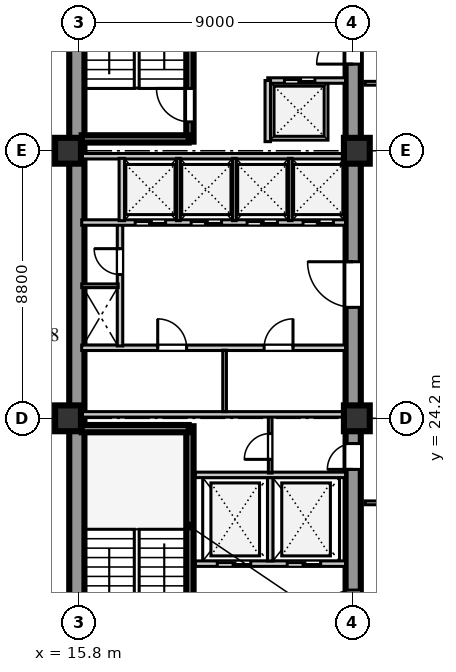
"""IFC4 building model, lengths in metres.
Left out: names, types, materials, properties, quantities, classifications, styles, units other than length and angle.
Written with IfcOpenShell. Run it as: python <this file> out.ifc"""

import sys

from ifc_helpers import new_model, si_unit, direction, frame, frame_2d, origin, origin_2d, place, context, subcontext, project, spatial, rectangle, extrude, element, fill, save


model = new_model("IFC4")
c1 = context("Model", 3, precision=1e-05, world=origin(), true_north=direction((0.0, 1.0)))
c2 = subcontext(c1, "Body", "Model", "MODEL_VIEW")
j1 = project(units=[si_unit("LENGTHUNIT", "METRE"), si_unit("PLANEANGLEUNIT", "RADIAN")], contexts=[c1])
p1 = place(None, origin())
s1 = spatial("IfcSite", under=j1, at=p1, CompositionType="ELEMENT")
p2 = place(p1, origin())
s2 = spatial("IfcBuilding", under=s1, at=p2, CompositionType="ELEMENT")
p3 = place(p2, frame((0.0, 0.0, 165.6)))
s3 = spatial("IfcBuildingStorey", under=s2, at=p3, CompositionType="ELEMENT", Elevation=165.6)
p4 = place(p3, frame((15.74, 15.81, 0.0), z_axis=(0.0, 0.0, 1.0), x_axis=(0.0, 1.0, 0.0)))
e1 = element("IfcWall", 1, at=p4, inside=s3, PredefinedType="SHEAR", context=c2, shape_type="SweptSolid", body=[
    extrude(rectangle(XDim=25.63, YDim=0.5, at=frame_2d((12.815, 0.0))), origin(), (0.0, 0.0, 1.0), 3.6),
])
p5 = place(p3, frame((24.83, 15.74, 0.0), z_axis=(0.0, 0.0, 1.0), x_axis=(0.0, 1.0, 0.0)))
e2 = element("IfcWall", 2, at=p5, inside=s3, PredefinedType="SHEAR", context=c2, shape_type="SweptSolid", body=[
    extrude(rectangle(XDim=25.76, YDim=0.5, at=frame_2d((12.88, 0.0))), origin(), (0.0, 0.0, 1.0), 3.6),
])
p6 = place(p5, frame((1.61, 0.0, 0.0)))
e3 = element("IfcOpeningElement", 3, at=p6, cuts=e2, PredefinedType="OPENING", context=c2, shape_type="SweptSolid", body=[
    extrude(rectangle(XDim=1.2, YDim=2.1, at=frame_2d((0.6, 1.05))), frame((0.0, 0.26, 0.0), z_axis=(0.0, -1.0, 0.0), x_axis=(1.0, 0.0, 0.0)), (0.0, 0.0, 1.0), 0.52),
])
p7 = place(p5, frame((6.78, 0.0, 0.0)))
e4 = element("IfcOpeningElement", 4, at=p7, cuts=e2, PredefinedType="OPENING", context=c2, shape_type="SweptSolid", body=[
    extrude(rectangle(XDim=0.85, YDim=2.06, at=frame_2d((0.425, 1.03))), frame((0.0, 0.26, 0.0), z_axis=(0.0, -1.0, 0.0), x_axis=(1.0, 0.0, 0.0)), (0.0, 0.0, 1.0), 0.52),
])
p8 = place(p5, frame((12.11, 0.0, 0.0)))
e5 = element("IfcOpeningElement", 5, at=p8, cuts=e2, PredefinedType="OPENING", context=c2, shape_type="SweptSolid", body=[
    extrude(rectangle(XDim=1.5, YDim=2.12, at=frame_2d((0.75, 1.06))), frame((0.0, 0.26, 0.0), z_axis=(0.0, -1.0, 0.0), x_axis=(1.0, 0.0, 0.0)), (0.0, 0.0, 1.0), 0.52),
])
p9 = place(p5, frame((20.11, 0.0, 0.0)))
e6 = element("IfcOpeningElement", 6, at=p9, cuts=e2, PredefinedType="OPENING", context=c2, shape_type="SweptSolid", body=[
    extrude(rectangle(XDim=1.2, YDim=2.12, at=frame_2d((0.6, 1.06))), frame((0.0, 0.26, 0.0), z_axis=(0.0, -1.0, 0.0), x_axis=(1.0, 0.0, 0.0)), (0.0, 0.0, 1.0), 0.52),
])
p10 = place(p5, frame((24.01, 0.0, 0.0)))
e7 = element("IfcOpeningElement", 7, at=p10, cuts=e2, PredefinedType="OPENING", context=c2, shape_type="SweptSolid", body=[
    extrude(rectangle(XDim=0.95, YDim=2.1, at=frame_2d((0.475, 1.05))), frame((0.0, 0.26, 0.0), z_axis=(0.0, -1.0, 0.0), x_axis=(1.0, 0.0, 0.0)), (0.0, 0.0, 1.0), 0.52),
])
for number, where, z_axis, x_axis in (
    (8, (15.45, 24.2, 0.0), (0.0, 0.0, 1.0), (1.0, 0.0, 0.0)),
    (9, (15.45, 33.0, 0.0), (0.0, 0.0, 1.0), (1.0, 0.0, 0.0)),
    (10, (24.95, 24.2, 0.0), (0.0, 0.0, 1.0), (1.0, 0.0, 0.0)),
    (11, (24.95, 33.0, 0.0), (0.0, 0.0, 1.0), (1.0, 0.0, 0.0)),
):
    element("IfcColumn", number, at=place(p3, frame(where, z_axis=z_axis, x_axis=x_axis)), inside=s3, PredefinedType="COLUMN", context=c2, shape_type="SweptSolid", body=[
        extrude(rectangle(XDim=0.85, YDim=0.85, at=origin_2d()), origin(), (0.0, 0.0, 1.0), 3.6),
    ])
p11 = place(p3, frame((19.46, 15.74, 0.0), z_axis=(0.0, 0.0, 1.0), x_axis=(0.0, 1.0, 0.0)))
e12 = element("IfcWall", 12, at=p11, inside=s3, PredefinedType="SHEAR", context=c2, shape_type="SweptSolid", body=[
    extrude(rectangle(XDim=8.2, YDim=0.24, at=frame_2d((4.1, 0.0))), origin(), (0.0, 0.0, 1.0), 3.85),
])
p12 = place(p11, frame((0.45, 0.0, 0.0)))
e13 = element("IfcOpeningElement", 13, at=p12, cuts=e12, PredefinedType="OPENING", context=c2, shape_type="SweptSolid", body=[
    extrude(rectangle(XDim=1.1, YDim=2.1, at=frame_2d((0.55, 1.05))), frame((0.0, 0.13, 0.0), z_axis=(0.0, -1.0, 0.0), x_axis=(1.0, 0.0, 0.0)), (0.0, 0.0, 1.0), 0.26),
])
p13 = place(p3, frame((15.9, 23.86, 0.0), z_axis=(0.0, 0.0, 1.0), x_axis=(1.0, 0.0, 0.0)))
e14 = element("IfcWall", 14, at=p13, inside=s3, PredefinedType="SHEAR", context=c2, shape_type="SweptSolid", body=[
    extrude(rectangle(XDim=3.52, YDim=0.24, at=frame_2d((1.76, 0.0))), origin(), (0.0, 0.0, 1.0), 3.85),
])
p14 = place(p3, frame((19.64, 19.42, 0.0), z_axis=(0.0, 0.0, 1.0), x_axis=(1.0, 0.0, 0.0)))
e15 = element("IfcWall", 15, at=p14, inside=s3, PredefinedType="SOLIDWALL", context=c2, shape_type="SweptSolid", body=[
    extrude(rectangle(XDim=4.94, YDim=0.18, at=frame_2d((2.47, 0.0))), origin(), (0.0, 0.0, 1.0), 3.6),
])
p15 = place(p14, frame((0.72, 0.0, 0.0)))
e16 = element("IfcOpeningElement", 16, at=p15, cuts=e15, PredefinedType="OPENING", context=c2, shape_type="SweptSolid", body=[
    extrude(rectangle(XDim=1.1, YDim=2.1, at=frame_2d((0.55, 1.05))), frame((0.0, 0.1, 0.0), z_axis=(0.0, -1.0, 0.0), x_axis=(1.0, 0.0, 0.0)), (0.0, 0.0, 1.0), 0.2),
])
p16 = place(p14, frame((3.02, 0.0, 0.0)))
e17 = element("IfcOpeningElement", 17, at=p16, cuts=e15, PredefinedType="OPENING", context=c2, shape_type="SweptSolid", body=[
    extrude(rectangle(XDim=1.1, YDim=2.1, at=frame_2d((0.55, 1.05))), frame((0.0, 0.1, 0.0), z_axis=(0.0, -1.0, 0.0), x_axis=(1.0, 0.0, 0.0)), (0.0, 0.0, 1.0), 0.2),
])
p17 = place(p3, frame((22.1, 19.51, 0.0), z_axis=(0.0, 0.0, 1.0), x_axis=(0.0, 1.0, 0.0)))
e18 = element("IfcWall", 18, at=p17, inside=s3, PredefinedType="SOLIDWALL", context=c2, shape_type="SweptSolid", body=[
    extrude(rectangle(XDim=2.74, YDim=0.18, at=frame_2d((1.37, 0.0))), origin(), (0.0, 0.0, 1.0), 3.6),
])
p18 = place(p3, frame((19.64, 22.34, 0.0), z_axis=(0.0, 0.0, 1.0), x_axis=(1.0, 0.0, 0.0)))
e19 = element("IfcWall", 19, at=p18, inside=s3, PredefinedType="SOLIDWALL", context=c2, shape_type="SweptSolid", body=[
    extrude(rectangle(XDim=4.94, YDim=0.18, at=frame_2d((2.47, 0.0))), origin(), (0.0, 0.0, 1.0), 3.6),
])
p19 = place(p3, frame((22.1, 22.4, 0.0), z_axis=(0.0, 0.0, 1.0), x_axis=(0.0, 1.0, 0.0)))
e20 = element("IfcWall", 20, at=p19, inside=s3, PredefinedType="PARTITIONING", context=c2, shape_type="SweptSolid", body=[
    extrude(rectangle(XDim=1.88, YDim=0.12, at=frame_2d((0.94, 0.0))), origin(), (0.0, 0.0, 1.0), 3.6),
])
p20 = place(p19, frame((0.45, 0.0, 0.0)))
e21 = element("IfcOpeningElement", 21, at=p20, cuts=e20, PredefinedType="OPENING", context=c2, shape_type="SweptSolid", body=[
    extrude(rectangle(XDim=0.85, YDim=2.06, at=frame_2d((0.425, 1.03))), frame((0.0, 0.07, 0.0), z_axis=(0.0, -1.0, 0.0), x_axis=(1.0, 0.0, 0.0)), (0.0, 0.0, 1.0), 0.14),
])
p21 = place(p3, frame((15.9, 26.52, 0.0), z_axis=(0.0, 0.0, 1.0), x_axis=(1.0, 0.0, 0.0)))
e22 = element("IfcWall", 22, at=p21, inside=s3, PredefinedType="SOLIDWALL", context=c2, shape_type="SweptSolid", body=[
    extrude(rectangle(XDim=8.68, YDim=0.18, at=frame_2d((4.34, 0.0))), origin(), (0.0, 0.0, 1.0), 3.6),
])
p22 = place(p21, frame((2.5, 0.0, 0.0)))
e23 = element("IfcOpeningElement", 23, at=p22, cuts=e22, PredefinedType="OPENING", context=c2, shape_type="SweptSolid", body=[
    extrude(rectangle(XDim=0.95, YDim=2.1, at=frame_2d((0.475, 1.05))), frame((0.0, 0.1, 0.0), z_axis=(0.0, -1.0, 0.0), x_axis=(1.0, 0.0, 0.0)), (0.0, 0.0, 1.0), 0.2),
])
p23 = place(p21, frame((6.0, 0.0, 0.0)))
e24 = element("IfcOpeningElement", 24, at=p23, cuts=e22, PredefinedType="OPENING", context=c2, shape_type="SweptSolid", body=[
    extrude(rectangle(XDim=0.95, YDim=2.1, at=frame_2d((0.475, 1.05))), frame((0.0, 0.1, 0.0), z_axis=(0.0, -1.0, 0.0), x_axis=(1.0, 0.0, 0.0)), (0.0, 0.0, 1.0), 0.2),
])
p24 = place(p3, frame((15.9, 24.33, 0.0), z_axis=(0.0, 0.0, 1.0), x_axis=(1.0, 0.0, 0.0)))
e25 = element("IfcWall", 25, at=p24, inside=s3, PredefinedType="SOLIDWALL", context=c2, shape_type="SweptSolid", body=[
    extrude(rectangle(XDim=8.68, YDim=0.18, at=frame_2d((4.34, 0.0))), origin(), (0.0, 0.0, 1.0), 2.95),
])
p25 = place(p3, frame((20.6, 24.42, 0.0), z_axis=(0.0, 0.0, 1.0), x_axis=(0.0, 1.0, 0.0)))
e26 = element("IfcWall", 26, at=p25, inside=s3, PredefinedType="PARTITIONING", context=c2, shape_type="SweptSolid", body=[
    extrude(rectangle(XDim=2.02, YDim=0.12, at=frame_2d((1.01, 0.0))), origin(), (0.0, 0.0, 1.0), 3.6),
])
p26 = place(p3, frame((17.16, 26.58, 0.0), z_axis=(0.0, 0.0, 1.0), x_axis=(0.0, 1.0, 0.0)))
e27 = element("IfcWall", 27, at=p26, inside=s3, PredefinedType="SOLIDWALL", context=c2, shape_type="SweptSolid", body=[
    extrude(rectangle(XDim=4.02, YDim=0.18, at=frame_2d((2.01, 0.0))), origin(), (0.0, 0.0, 1.0), 3.6),
])
p27 = place(p26, frame((2.35, 0.0, 0.0)))
e28 = element("IfcOpeningElement", 28, at=p27, cuts=e27, PredefinedType="OPENING", context=c2, shape_type="SweptSolid", body=[
    extrude(rectangle(XDim=0.85, YDim=2.06, at=frame_2d((0.425, 1.03))), frame((0.0, 0.1, 0.0), z_axis=(0.0, -1.0, 0.0), x_axis=(1.0, 0.0, 0.0)), (0.0, 0.0, 1.0), 0.2),
])
p28 = place(p3, frame((15.9, 28.56, 0.0), z_axis=(0.0, 0.0, 1.0), x_axis=(1.0, 0.0, 0.0)))
e29 = element("IfcWall", 29, at=p28, inside=s3, PredefinedType="PARTITIONING", context=c2, shape_type="SweptSolid", body=[
    extrude(rectangle(XDim=1.2, YDim=0.12, at=frame_2d((0.6, 0.0))), origin(), (0.0, 0.0, 1.0), 3.6),
])
p29 = place(p3, frame((15.9, 30.64, 0.0), z_axis=(0.0, 0.0, 1.0), x_axis=(1.0, 0.0, 0.0)))
e30 = element("IfcWall", 30, at=p29, inside=s3, PredefinedType="SOLIDWALL", context=c2, shape_type="SweptSolid", body=[
    extrude(rectangle(XDim=8.68, YDim=0.18, at=frame_2d((4.34, 0.0))), origin(), (0.0, 0.0, 1.0), 3.6),
])
p30 = place(p29, frame((1.76, 0.0, 0.0)))
e31 = element("IfcOpeningElement", 31, at=p30, cuts=e30, PredefinedType="OPENING", context=c2, shape_type="SweptSolid", body=[
    extrude(rectangle(XDim=1.0, YDim=2.1, at=frame_2d((0.5, 1.05))), frame((0.0, 0.1, 0.0), z_axis=(0.0, -1.0, 0.0), x_axis=(1.0, 0.0, 0.0)), (0.0, 0.0, 1.0), 0.2),
])
p31 = place(p29, frame((3.6, 0.0, 0.0)))
e32 = element("IfcOpeningElement", 32, at=p31, cuts=e30, PredefinedType="OPENING", context=c2, shape_type="SweptSolid", body=[
    extrude(rectangle(XDim=1.0, YDim=2.1, at=frame_2d((0.5, 1.05))), frame((0.0, 0.1, 0.0), z_axis=(0.0, -1.0, 0.0), x_axis=(1.0, 0.0, 0.0)), (0.0, 0.0, 1.0), 0.2),
])
p32 = place(p29, frame((5.44, 0.0, 0.0)))
e33 = element("IfcOpeningElement", 33, at=p32, cuts=e30, PredefinedType="OPENING", context=c2, shape_type="SweptSolid", body=[
    extrude(rectangle(XDim=1.0, YDim=2.1, at=frame_2d((0.5, 1.05))), frame((0.0, 0.1, 0.0), z_axis=(0.0, -1.0, 0.0), x_axis=(1.0, 0.0, 0.0)), (0.0, 0.0, 1.0), 0.2),
])
p33 = place(p29, frame((7.28, 0.0, 0.0)))
e34 = element("IfcOpeningElement", 34, at=p33, cuts=e30, PredefinedType="OPENING", context=c2, shape_type="SweptSolid", body=[
    extrude(rectangle(XDim=1.0, YDim=2.1, at=frame_2d((0.5, 1.05))), frame((0.0, 0.1, 0.0), z_axis=(0.0, -1.0, 0.0), x_axis=(1.0, 0.0, 0.0)), (0.0, 0.0, 1.0), 0.2),
])
p34 = place(p3, frame((15.9, 32.82, 0.0), z_axis=(0.0, 0.0, 1.0), x_axis=(1.0, 0.0, 0.0)))
e35 = element("IfcWall", 35, at=p34, inside=s3, PredefinedType="SOLIDWALL", context=c2, shape_type="SweptSolid", body=[
    extrude(rectangle(XDim=8.68, YDim=0.18, at=frame_2d((4.34, 0.0))), origin(), (0.0, 0.0, 1.0), 2.95),
])
p35 = place(p3, frame((17.22, 30.7, 0.0), z_axis=(0.0, 0.0, 1.0), x_axis=(0.0, 1.0, 0.0)))
e36 = element("IfcWall", 36, at=p35, inside=s3, PredefinedType="SOLIDWALL", context=c2, shape_type="SweptSolid", body=[
    extrude(rectangle(XDim=2.05, YDim=0.18, at=frame_2d((1.025, 0.0))), origin(), (0.0, 0.0, 1.0), 3.6),
])
for number, where, z_axis, x_axis in (
    (37, (19.08, 30.7, 0.0), (0.0, 0.0, 1.0), (0.0, 1.0, 0.0)),
    (38, (20.92, 30.7, 0.0), (0.0, 0.0, 1.0), (0.0, 1.0, 0.0)),
    (39, (22.76, 30.7, 0.0), (0.0, 0.0, 1.0), (0.0, 1.0, 0.0)),
):
    element("IfcWall", number, at=place(p3, frame(where, z_axis=z_axis, x_axis=x_axis)), inside=s3, PredefinedType="PARTITIONING", context=c2, shape_type="SweptSolid", body=[
        extrude(rectangle(XDim=2.05, YDim=0.12, at=frame_2d((1.025, 0.0))), origin(), (0.0, 0.0, 1.0), 3.6),
    ])
p36 = place(p3, frame((19.46, 33.3, 0.0), z_axis=(0.0, 0.0, 1.0), x_axis=(0.0, 1.0, 0.0)))
e40 = element("IfcWall", 40, at=p36, inside=s3, PredefinedType="SHEAR", context=c2, shape_type="SweptSolid", body=[
    extrude(rectangle(XDim=8.18, YDim=0.24, at=frame_2d((4.09, 0.0))), origin(), (0.0, 0.0, 1.0), 3.85),
])
p37 = place(p36, frame((0.65, 0.0, 0.0)))
e41 = element("IfcOpeningElement", 41, at=p37, cuts=e40, PredefinedType="OPENING", context=c2, shape_type="SweptSolid", body=[
    extrude(rectangle(XDim=1.1, YDim=2.1, at=frame_2d((0.55, 1.05))), frame((0.0, 0.13, 0.0), z_axis=(0.0, -1.0, 0.0), x_axis=(1.0, 0.0, 0.0)), (0.0, 0.0, 1.0), 0.26),
])
p38 = place(p3, frame((15.9, 33.39, 0.0), z_axis=(0.0, 0.0, 1.0), x_axis=(1.0, 0.0, 0.0)))
e42 = element("IfcWall", 42, at=p38, inside=s3, PredefinedType="SHEAR", context=c2, shape_type="SweptSolid", body=[
    extrude(rectangle(XDim=3.52, YDim=0.24, at=frame_2d((1.76, 0.0))), origin(), (0.0, 0.0, 1.0), 3.85),
])
p39 = place(p3, frame((22.02, 35.31, 0.0), z_axis=(0.0, 0.0, 1.0), x_axis=(1.0, 0.0, 0.0)))
e43 = element("IfcWall", 43, at=p39, inside=s3, PredefinedType="SOLIDWALL", context=c2, shape_type="SweptSolid", body=[
    extrude(rectangle(XDim=2.56, YDim=0.18, at=frame_2d((1.28, 0.0))), origin(), (0.0, 0.0, 1.0), 3.6),
])
p40 = place(p39, frame((0.55, 0.0, 0.0)))
e44 = element("IfcOpeningElement", 44, at=p40, cuts=e43, PredefinedType="OPENING", context=c2, shape_type="SweptSolid", body=[
    extrude(rectangle(XDim=1.0, YDim=2.1, at=frame_2d((0.5, 1.05))), frame((0.0, 0.1, 0.0), z_axis=(0.0, -1.0, 0.0), x_axis=(1.0, 0.0, 0.0)), (0.0, 0.0, 1.0), 0.2),
])
p41 = place(p3, frame((22.02, 33.3, 0.0), z_axis=(0.0, 0.0, 1.0), x_axis=(0.0, 1.0, 0.0)))
e45 = element("IfcWall", 45, at=p41, inside=s3, PredefinedType="SOLIDWALL", context=c2, shape_type="SweptSolid", body=[
    extrude(rectangle(XDim=2.01, YDim=0.18, at=frame_2d((1.005, 0.0))), origin(), (0.0, 0.0, 1.0), 3.6),
])
p42 = place(p3, frame((25.22, 21.42, 0.0), z_axis=(0.0, 0.0, 1.0), x_axis=(1.0, 0.0, 0.0)))
e46 = element("IfcWall", 46, at=p42, inside=s3, PredefinedType="PLUMBINGWALL", context=c2, shape_type="SweptSolid", body=[
    extrude(rectangle(XDim=15.6, YDim=0.125, at=frame_2d((7.8, 0.0))), origin(), (0.0, 0.0, 1.0), 3.25),
])
p43 = place(p42, frame((0.73, 0.0, 0.0)))
e47 = element("IfcOpeningElement", 47, at=p43, cuts=e46, PredefinedType="OPENING", context=c2, shape_type="SweptSolid", body=[
    extrude(rectangle(XDim=0.95, YDim=2.1, at=frame_2d((0.475, 1.05))), frame((0.0, 0.073, 0.0), z_axis=(0.0, -1.0, 0.0), x_axis=(1.0, 0.0, 0.0)), (0.0, 0.0, 1.0), 0.145),
])
p44 = place(p42, frame((7.23, 0.0, 0.0)))
e48 = element("IfcOpeningElement", 48, at=p44, cuts=e46, PredefinedType="OPENING", context=c2, shape_type="SweptSolid", body=[
    extrude(rectangle(XDim=0.95, YDim=2.1, at=frame_2d((0.475, 1.05))), frame((0.0, 0.073, 0.0), z_axis=(0.0, -1.0, 0.0), x_axis=(1.0, 0.0, 0.0)), (0.0, 0.0, 1.0), 0.145),
])
p45 = place(p3, frame((25.22, 35.22, 0.0), z_axis=(0.0, 0.0, 1.0), x_axis=(1.0, 0.0, 0.0)))
e49 = element("IfcWall", 49, at=p45, inside=s3, PredefinedType="PLUMBINGWALL", context=c2, shape_type="SweptSolid", body=[
    extrude(rectangle(XDim=9.5, YDim=0.125, at=frame_2d((4.75, 0.0))), origin(), (0.0, 0.0, 1.0), 3.6),
])
p46 = place(p45, frame((0.65, 0.0, 0.0)))
e50 = element("IfcOpeningElement", 50, at=p46, cuts=e49, PredefinedType="OPENING", context=c2, shape_type="SweptSolid", body=[
    extrude(rectangle(XDim=0.95, YDim=2.1, at=frame_2d((0.475, 1.05))), frame((0.0, 0.073, 0.0), z_axis=(0.0, -1.0, 0.0), x_axis=(1.0, 0.0, 0.0)), (0.0, 0.0, 1.0), 0.145),
])
p47 = place(p45, frame((5.2, 0.0, 0.0)))
e51 = element("IfcOpeningElement", 51, at=p47, cuts=e49, PredefinedType="OPENING", context=c2, shape_type="SweptSolid", body=[
    extrude(rectangle(XDim=0.95, YDim=2.1, at=frame_2d((0.475, 1.05))), frame((0.0, 0.073, 0.0), z_axis=(0.0, -1.0, 0.0), x_axis=(1.0, 0.0, 0.0)), (0.0, 0.0, 1.0), 0.145),
])
p48 = place(p15, origin())
e52 = element("IfcDoor", 52, at=p48, inside=s3, OperationType="DOUBLE_DOOR_SLIDING", PredefinedType="DOOR", context=c2, shape_type="SweptSolid", body=[
    extrude(rectangle(XDim=1.1, YDim=2.1, at=frame_2d((0.55, 1.05))), frame((0.0, 0.025, 0.0), z_axis=(0.0, -1.0, 0.0), x_axis=(1.0, 0.0, 0.0)), (0.0, 0.0, 1.0), 0.05),
])
fill(e16, e52)
p49 = place(p16, origin())
e53 = element("IfcDoor", 53, at=p49, inside=s3, OperationType="DOUBLE_DOOR_SLIDING", PredefinedType="DOOR", context=c2, shape_type="SweptSolid", body=[
    extrude(rectangle(XDim=1.1, YDim=2.1, at=frame_2d((0.55, 1.05))), frame((0.0, 0.025, 0.0), z_axis=(0.0, -1.0, 0.0), x_axis=(1.0, 0.0, 0.0)), (0.0, 0.0, 1.0), 0.05),
])
fill(e17, e53)
p50 = place(p6, frame((1.2, 0.0, 0.0), z_axis=(0.0, 0.0, 1.0), x_axis=(-1.0, 0.0, 0.0)))
e54 = element("IfcDoor", 54, at=p50, inside=s3, OperationType="SINGLE_SWING_RIGHT", PredefinedType="DOOR", context=c2, shape_type="SweptSolid", body=[
    extrude(rectangle(XDim=1.2, YDim=2.1, at=frame_2d((0.6, 1.05))), frame((0.0, 0.025, 0.0), z_axis=(0.0, -1.0, 0.0), x_axis=(1.0, 0.0, 0.0)), (0.0, 0.0, 1.0), 0.05),
])
fill(e3, e54)
p51 = place(p20, origin())
e55 = element("IfcDoor", 55, at=p51, inside=s3, OperationType="SINGLE_SWING_LEFT", PredefinedType="DOOR", context=c2, shape_type="SweptSolid", body=[
    extrude(rectangle(XDim=0.85, YDim=2.06, at=frame_2d((0.425, 1.03))), frame((0.0, 0.025, 0.0), z_axis=(0.0, -1.0, 0.0), x_axis=(1.0, 0.0, 0.0)), (0.0, 0.0, 1.0), 0.05),
])
fill(e21, e55)
p52 = place(p7, frame((0.85, 0.0, 0.0), z_axis=(0.0, 0.0, 1.0), x_axis=(-1.0, 0.0, 0.0)))
e56 = element("IfcDoor", 56, at=p52, inside=s3, OperationType="SINGLE_SWING_RIGHT", PredefinedType="DOOR", context=c2, shape_type="SweptSolid", body=[
    extrude(rectangle(XDim=0.85, YDim=2.06, at=frame_2d((0.425, 1.03))), frame((0.0, 0.025, 0.0), z_axis=(0.0, -1.0, 0.0), x_axis=(1.0, 0.0, 0.0)), (0.0, 0.0, 1.0), 0.05),
])
fill(e4, e56)
p53 = place(p22, origin())
e57 = element("IfcDoor", 57, at=p53, inside=s3, OperationType="SINGLE_SWING_LEFT", PredefinedType="DOOR", context=c2, shape_type="SweptSolid", body=[
    extrude(rectangle(XDim=0.95, YDim=2.1, at=frame_2d((0.475, 1.05))), frame((0.0, 0.025, 0.0), z_axis=(0.0, -1.0, 0.0), x_axis=(1.0, 0.0, 0.0)), (0.0, 0.0, 1.0), 0.05),
])
fill(e23, e57)
p54 = place(p23, origin())
e58 = element("IfcDoor", 58, at=p54, inside=s3, OperationType="SINGLE_SWING_RIGHT", PredefinedType="DOOR", context=c2, shape_type="SweptSolid", body=[
    extrude(rectangle(XDim=0.95, YDim=2.1, at=frame_2d((0.475, 1.05))), frame((0.0, 0.025, 0.0), z_axis=(0.0, -1.0, 0.0), x_axis=(1.0, 0.0, 0.0)), (0.0, 0.0, 1.0), 0.05),
])
fill(e24, e58)
p55 = place(p27, origin())
e59 = element("IfcDoor", 59, at=p55, inside=s3, OperationType="SINGLE_SWING_RIGHT", PredefinedType="DOOR", context=c2, shape_type="SweptSolid", body=[
    extrude(rectangle(XDim=0.85, YDim=2.06, at=frame_2d((0.425, 1.03))), frame((0.0, 0.025, 0.0), z_axis=(0.0, -1.0, 0.0), x_axis=(1.0, 0.0, 0.0)), (0.0, 0.0, 1.0), 0.05),
])
fill(e28, e59)
p56 = place(p8, frame((1.5, 0.0, 0.0), z_axis=(0.0, 0.0, 1.0), x_axis=(-1.0, 0.0, 0.0)))
e60 = element("IfcDoor", 60, at=p56, inside=s3, OperationType="SINGLE_SWING_LEFT", PredefinedType="DOOR", context=c2, shape_type="SweptSolid", body=[
    extrude(rectangle(XDim=1.5, YDim=2.12, at=frame_2d((0.75, 1.06))), frame((0.0, 0.025, 0.0), z_axis=(0.0, -1.0, 0.0), x_axis=(1.0, 0.0, 0.0)), (0.0, 0.0, 1.0), 0.05),
])
fill(e5, e60)
p57 = place(p30, frame((1.0, 0.0, 0.0), z_axis=(0.0, 0.0, 1.0), x_axis=(-1.0, 0.0, 0.0)))
e61 = element("IfcDoor", 61, at=p57, inside=s3, OperationType="DOUBLE_DOOR_SLIDING", PredefinedType="DOOR", context=c2, shape_type="SweptSolid", body=[
    extrude(rectangle(XDim=1.0, YDim=2.1, at=frame_2d((0.5, 1.05))), frame((0.0, 0.025, 0.0), z_axis=(0.0, -1.0, 0.0), x_axis=(1.0, 0.0, 0.0)), (0.0, 0.0, 1.0), 0.05),
])
fill(e31, e61)
p58 = place(p31, frame((1.0, 0.0, 0.0), z_axis=(0.0, 0.0, 1.0), x_axis=(-1.0, 0.0, 0.0)))
e62 = element("IfcDoor", 62, at=p58, inside=s3, OperationType="DOUBLE_DOOR_SLIDING", PredefinedType="DOOR", context=c2, shape_type="SweptSolid", body=[
    extrude(rectangle(XDim=1.0, YDim=2.1, at=frame_2d((0.5, 1.05))), frame((0.0, 0.025, 0.0), z_axis=(0.0, -1.0, 0.0), x_axis=(1.0, 0.0, 0.0)), (0.0, 0.0, 1.0), 0.05),
])
fill(e32, e62)
p59 = place(p32, frame((1.0, 0.0, 0.0), z_axis=(0.0, 0.0, 1.0), x_axis=(-1.0, 0.0, 0.0)))
e63 = element("IfcDoor", 63, at=p59, inside=s3, OperationType="DOUBLE_DOOR_SLIDING", PredefinedType="DOOR", context=c2, shape_type="SweptSolid", body=[
    extrude(rectangle(XDim=1.0, YDim=2.1, at=frame_2d((0.5, 1.05))), frame((0.0, 0.025, 0.0), z_axis=(0.0, -1.0, 0.0), x_axis=(1.0, 0.0, 0.0)), (0.0, 0.0, 1.0), 0.05),
])
fill(e33, e63)
p60 = place(p33, frame((1.0, 0.0, 0.0), z_axis=(0.0, 0.0, 1.0), x_axis=(-1.0, 0.0, 0.0)))
e64 = element("IfcDoor", 64, at=p60, inside=s3, OperationType="DOUBLE_DOOR_SLIDING", PredefinedType="DOOR", context=c2, shape_type="SweptSolid", body=[
    extrude(rectangle(XDim=1.0, YDim=2.1, at=frame_2d((0.5, 1.05))), frame((0.0, 0.025, 0.0), z_axis=(0.0, -1.0, 0.0), x_axis=(1.0, 0.0, 0.0)), (0.0, 0.0, 1.0), 0.05),
])
fill(e34, e64)
p61 = place(p37, origin())
e65 = element("IfcDoor", 65, at=p61, inside=s3, OperationType="SINGLE_SWING_RIGHT", PredefinedType="DOOR", context=c2, shape_type="SweptSolid", body=[
    extrude(rectangle(XDim=1.1, YDim=2.1, at=frame_2d((0.55, 1.05))), frame((0.0, 0.025, 0.0), z_axis=(0.0, -1.0, 0.0), x_axis=(1.0, 0.0, 0.0)), (0.0, 0.0, 1.0), 0.05),
])
fill(e41, e65)
p62 = place(p9, frame((1.2, 0.0, 0.0), z_axis=(0.0, 0.0, 1.0), x_axis=(-1.0, 0.0, 0.0)))
e66 = element("IfcDoor", 66, at=p62, inside=s3, OperationType="SINGLE_SWING_RIGHT", PredefinedType="DOOR", context=c2, shape_type="SweptSolid", body=[
    extrude(rectangle(XDim=1.2, YDim=2.12, at=frame_2d((0.6, 1.06))), frame((0.0, 0.025, 0.0), z_axis=(0.0, -1.0, 0.0), x_axis=(1.0, 0.0, 0.0)), (0.0, 0.0, 1.0), 0.05),
])
fill(e6, e66)
p63 = place(p40, origin())
e67 = element("IfcDoor", 67, at=p63, inside=s3, OperationType="DOUBLE_DOOR_SLIDING", PredefinedType="DOOR", context=c2, shape_type="SweptSolid", body=[
    extrude(rectangle(XDim=1.0, YDim=2.1, at=frame_2d((0.5, 1.05))), frame((0.0, 0.025, 0.0), z_axis=(0.0, -1.0, 0.0), x_axis=(1.0, 0.0, 0.0)), (0.0, 0.0, 1.0), 0.05),
])
fill(e44, e67)
save(model, sys.argv[1])
